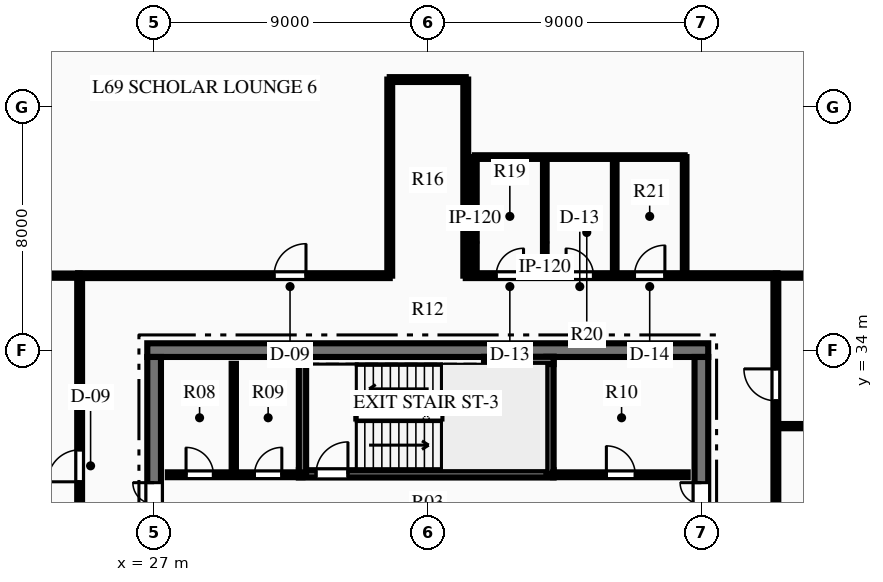
"""IFC4 building model, lengths in metres.
Left out: names, types, materials, properties, quantities, classifications, styles, units other than length and angle.
Written with IfcOpenShell. Run it as: python <this file> out.ifc"""

import sys

from ifc_helpers import new_model, si_unit, direction, frame, frame_2d, origin, place, context, subcontext, project, spatial, rectangle, extrude, element, fill, save


model = new_model("IFC4")
c1 = context("Model", 3, precision=1e-05, world=origin(), true_north=direction((0.0, 1.0)))
c2 = subcontext(c1, "Body", "Model", "MODEL_VIEW")
j1 = project(units=[si_unit("LENGTHUNIT", "METRE"), si_unit("PLANEANGLEUNIT", "RADIAN")], contexts=[c1])
p1 = place(None, origin())
s1 = spatial("IfcSite", under=j1, at=p1, CompositionType="ELEMENT")
p2 = place(p1, origin())
s2 = spatial("IfcBuilding", under=s1, at=p2, CompositionType="ELEMENT")
p3 = place(p2, frame((0.0, 0.0, 274.95)))
s3 = spatial("IfcBuildingStorey", under=s2, at=p3, CompositionType="ELEMENT", Elevation=274.95)
p4 = place(p3, frame((26.775, 34.0, 0.0), z_axis=(0.0, 0.0, 1.0), x_axis=(1.0, 0.0, 0.0)))
e1 = element("IfcWall", 1, at=p4, inside=s3, PredefinedType="SHEAR", context=c2, shape_type="SweptSolid", body=[
    extrude(rectangle(XDim=18.45, YDim=0.45, at=frame_2d((9.225, 0.0))), origin(), (0.0, 0.0, 1.0), 3.75),
])
p5 = place(p3, frame((27.0, 18.225, 0.0), z_axis=(0.0, 0.0, 1.0), x_axis=(0.0, 1.0, 0.0)))
e2 = element("IfcWall", 2, at=p5, inside=s3, PredefinedType="SHEAR", context=c2, shape_type="SweptSolid", body=[
    extrude(rectangle(XDim=15.55, YDim=0.45, at=frame_2d((7.775, 0.0))), origin(), (0.0, 0.0, 1.0), 3.75),
])
p6 = place(p5, frame((10.015, 0.0, 0.0)))
e3 = element("IfcOpeningElement", 3, at=p6, cuts=e2, PredefinedType="OPENING", context=c2, shape_type="SweptSolid", body=[
    extrude(rectangle(XDim=1.4, YDim=2.2, at=frame_2d((0.7, 1.1))), frame((0.0, 0.235, 0.0), z_axis=(0.0, -1.0, 0.0), x_axis=(1.0, 0.0, 0.0)), (0.0, 0.0, 1.0), 0.47),
])
p7 = place(p3, frame((45.0, 18.225, 0.0), z_axis=(0.0, 0.0, 1.0), x_axis=(0.0, 1.0, 0.0)))
e4 = element("IfcWall", 4, at=p7, inside=s3, PredefinedType="SHEAR", context=c2, shape_type="SweptSolid", body=[
    extrude(rectangle(XDim=15.55, YDim=0.45, at=frame_2d((7.775, 0.0))), origin(), (0.0, 0.0, 1.0), 3.75),
])
p8 = place(p7, frame((10.015, 0.0, 0.0)))
e5 = element("IfcOpeningElement", 5, at=p8, cuts=e4, PredefinedType="OPENING", context=c2, shape_type="SweptSolid", body=[
    extrude(rectangle(XDim=1.4, YDim=2.2, at=frame_2d((0.7, 1.1))), frame((0.0, 0.235, 0.0), z_axis=(0.0, -1.0, 0.0), x_axis=(1.0, 0.0, 0.0)), (0.0, 0.0, 1.0), 0.47),
])
p9 = place(p3, frame((31.76, 29.93, 0.0), z_axis=(0.0, 0.0, 1.0), x_axis=(1.0, 0.0, 0.0)))
e6 = element("IfcWall", 6, at=p9, inside=s3, PredefinedType="SHEAR", context=c2, shape_type="SweptSolid", body=[
    extrude(rectangle(XDim=8.38, YDim=0.24, at=frame_2d((4.19, 0.0))), origin(), (0.0, 0.0, 1.0), 3.75),
])
p10 = place(p9, frame((0.565, 0.0, 0.0)))
e7 = element("IfcOpeningElement", 7, at=p10, cuts=e6, PredefinedType="OPENING", context=c2, shape_type="SweptSolid", body=[
    extrude(rectangle(XDim=1.05, YDim=2.15, at=frame_2d((0.525, 1.075))), frame((0.0, 0.13, 0.0), z_axis=(0.0, -1.0, 0.0), x_axis=(1.0, 0.0, 0.0)), (0.0, 0.0, 1.0), 0.26),
])
p11 = place(p3, frame((31.88, 29.93, 0.0), z_axis=(0.0, 0.0, 1.0), x_axis=(0.0, 1.0, 0.0)))
e8 = element("IfcWall", 8, at=p11, inside=s3, PredefinedType="SHEAR", context=c2, shape_type="SweptSolid", body=[
    extrude(rectangle(XDim=3.79, YDim=0.24, at=frame_2d((1.895, 0.0))), origin(), (0.0, 0.0, 1.0), 3.75),
])
p12 = place(p3, frame((40.02, 29.93, 0.0), z_axis=(0.0, 0.0, 1.0), x_axis=(0.0, 1.0, 0.0)))
e9 = element("IfcWall", 9, at=p12, inside=s3, PredefinedType="SHEAR", context=c2, shape_type="SweptSolid", body=[
    extrude(rectangle(XDim=3.85, YDim=0.24, at=frame_2d((1.925, 0.0))), origin(), (0.0, 0.0, 1.0), 3.75),
])
p13 = place(p3, frame((37.85, 33.66, 0.0), z_axis=(0.0, 0.0, 1.0), x_axis=(1.0, 0.0, 0.0)))
e10 = element("IfcWall", 10, at=p13, inside=s3, PredefinedType="SHEAR", context=c2, shape_type="SweptSolid", body=[
    extrude(rectangle(XDim=2.29, YDim=0.24, at=frame_2d((1.145, 0.0))), origin(), (0.0, 0.0, 1.0), 3.75),
])
p14 = place(p3, frame((27.45, 29.9, 0.0), z_axis=(0.0, 0.0, 1.0), x_axis=(1.0, 0.0, 0.0)))
e11 = element("IfcWall", 11, at=p14, inside=s3, PredefinedType="PARTITIONING", context=c2, shape_type="SweptSolid", body=[
    extrude(rectangle(XDim=4.43, YDim=0.16, at=frame_2d((2.215, 0.0))), origin(), (0.0, 0.0, 1.0), 3.48),
])
p15 = place(p14, frame((0.6, 0.0, 0.0)))
e12 = element("IfcOpeningElement", 12, at=p15, cuts=e11, PredefinedType="OPENING", context=c2, shape_type="SweptSolid", body=[
    extrude(rectangle(XDim=0.9, YDim=2.15, at=frame_2d((0.45, 1.075))), frame((0.0, 0.09, 0.0), z_axis=(0.0, -1.0, 0.0), x_axis=(1.0, 0.0, 0.0)), (0.0, 0.0, 1.0), 0.18),
])
p16 = place(p14, frame((2.85, 0.0, 0.0)))
e13 = element("IfcOpeningElement", 13, at=p16, cuts=e11, PredefinedType="OPENING", context=c2, shape_type="SweptSolid", body=[
    extrude(rectangle(XDim=0.9, YDim=2.15, at=frame_2d((0.45, 1.075))), frame((0.0, 0.09, 0.0), z_axis=(0.0, -1.0, 0.0), x_axis=(1.0, 0.0, 0.0)), (0.0, 0.0, 1.0), 0.18),
])
p17 = place(p3, frame((29.62, 29.95, 0.0), z_axis=(0.0, 0.0, 1.0), x_axis=(0.0, 1.0, 0.0)))
e14 = element("IfcWall", 14, at=p17, inside=s3, PredefinedType="PARTITIONING", context=c2, shape_type="SweptSolid", body=[
    extrude(rectangle(XDim=3.6, YDim=0.14, at=frame_2d((1.8, 0.0))), origin(), (0.0, 0.0, 1.0), 3.48),
])
p18 = place(p3, frame((40.12, 29.9, 0.0), z_axis=(0.0, 0.0, 1.0), x_axis=(1.0, 0.0, 0.0)))
e15 = element("IfcWall", 15, at=p18, inside=s3, PredefinedType="PARTITIONING", context=c2, shape_type="SweptSolid", body=[
    extrude(rectangle(XDim=4.43, YDim=0.16, at=frame_2d((2.215, 0.0))), origin(), (0.0, 0.0, 1.0), 3.48),
])
p19 = place(p18, frame((1.755, 0.0, 0.0)))
e16 = element("IfcOpeningElement", 16, at=p19, cuts=e15, PredefinedType="OPENING", context=c2, shape_type="SweptSolid", body=[
    extrude(rectangle(XDim=0.95, YDim=2.15, at=frame_2d((0.475, 1.075))), frame((0.0, 0.09, 0.0), z_axis=(0.0, -1.0, 0.0), x_axis=(1.0, 0.0, 0.0)), (0.0, 0.0, 1.0), 0.18),
])
p20 = place(p3, frame((24.5, 36.45, 0.0), z_axis=(0.0, 0.0, 1.0), x_axis=(1.0, 0.0, 0.0)))
e17 = element("IfcWall", 17, at=p20, inside=s3, PredefinedType="PARTITIONING", context=c2, shape_type="SweptSolid", body=[
    extrude(rectangle(XDim=10.25, YDim=0.16, at=frame_2d((5.125, 0.0))), origin(), (0.0, 0.0, 1.0), 3.48),
])
p21 = place(p20, frame((6.445, 0.0, 0.0)))
e18 = element("IfcOpeningElement", 18, at=p21, cuts=e17, PredefinedType="OPENING", context=c2, shape_type="SweptSolid", body=[
    extrude(rectangle(XDim=1.05, YDim=2.15, at=frame_2d((0.525, 1.075))), frame((0.0, 0.09, 0.0), z_axis=(0.0, -1.0, 0.0), x_axis=(1.0, 0.0, 0.0)), (0.0, 0.0, 1.0), 0.18),
])
p22 = place(p3, frame((37.25, 36.45, 0.0), z_axis=(0.0, 0.0, 1.0), x_axis=(1.0, 0.0, 0.0)))
e19 = element("IfcWall", 19, at=p22, inside=s3, PredefinedType="PARTITIONING", context=c2, shape_type="SweptSolid", body=[
    extrude(rectangle(XDim=10.25, YDim=0.16, at=frame_2d((5.125, 0.0))), origin(), (0.0, 0.0, 1.0), 3.48),
])
p23 = place(p22, frame((1.0, 0.0, 0.0)))
e20 = element("IfcOpeningElement", 20, at=p23, cuts=e19, PredefinedType="OPENING", context=c2, shape_type="SweptSolid", body=[
    extrude(rectangle(XDim=0.9, YDim=2.15, at=frame_2d((0.45, 1.075))), frame((0.0, 0.09, 0.0), z_axis=(0.0, -1.0, 0.0), x_axis=(1.0, 0.0, 0.0)), (0.0, 0.0, 1.0), 0.18),
])
p24 = place(p22, frame((3.3, 0.0, 0.0)))
e21 = element("IfcOpeningElement", 21, at=p24, cuts=e19, PredefinedType="OPENING", context=c2, shape_type="SweptSolid", body=[
    extrude(rectangle(XDim=0.9, YDim=2.15, at=frame_2d((0.45, 1.075))), frame((0.0, 0.09, 0.0), z_axis=(0.0, -1.0, 0.0), x_axis=(1.0, 0.0, 0.0)), (0.0, 0.0, 1.0), 0.18),
])
p25 = place(p22, frame((5.55, 0.0, 0.0)))
e22 = element("IfcOpeningElement", 22, at=p25, cuts=e19, PredefinedType="OPENING", context=c2, shape_type="SweptSolid", body=[
    extrude(rectangle(XDim=1.0, YDim=2.15, at=frame_2d((0.5, 1.075))), frame((0.0, 0.09, 0.0), z_axis=(0.0, -1.0, 0.0), x_axis=(1.0, 0.0, 0.0)), (0.0, 0.0, 1.0), 0.18),
])
p26 = place(p3, frame((24.55, 27.25, 0.0), z_axis=(0.0, 0.0, 1.0), x_axis=(0.0, 1.0, 0.0)))
e23 = element("IfcWall", 23, at=p26, inside=s3, PredefinedType="PARTITIONING", context=c2, shape_type="SweptSolid", body=[
    extrude(rectangle(XDim=9.2, YDim=0.16, at=frame_2d((4.6, 0.0))), origin(), (0.0, 0.0, 1.0), 3.48),
])
p27 = place(p26, frame((2.419, 0.0, 0.0)))
e24 = element("IfcOpeningElement", 24, at=p27, cuts=e23, PredefinedType="OPENING", context=c2, shape_type="SweptSolid", body=[
    extrude(rectangle(XDim=1.05, YDim=2.15, at=frame_2d((0.525, 1.075))), frame((0.0, 0.09, 0.0), z_axis=(0.0, -1.0, 0.0), x_axis=(1.0, 0.0, 0.0)), (0.0, 0.0, 1.0), 0.18),
])
p28 = place(p3, frame((47.45, 27.25, 0.0), z_axis=(0.0, 0.0, 1.0), x_axis=(0.0, 1.0, 0.0)))
e25 = element("IfcWall", 25, at=p28, inside=s3, PredefinedType="PARTITIONING", context=c2, shape_type="SweptSolid", body=[
    extrude(rectangle(XDim=9.2, YDim=0.16, at=frame_2d((4.6, 0.0))), origin(), (0.0, 0.0, 1.0), 3.48),
])
p29 = place(p28, frame((5.083, 0.0, 0.0)))
e26 = element("IfcOpeningElement", 26, at=p29, cuts=e25, PredefinedType="OPENING", context=c2, shape_type="SweptSolid", body=[
    extrude(rectangle(XDim=1.05, YDim=2.15, at=frame_2d((0.525, 1.075))), frame((0.0, 0.09, 0.0), z_axis=(0.0, -1.0, 0.0), x_axis=(1.0, 0.0, 0.0)), (0.0, 0.0, 1.0), 0.18),
])
for number, where, z_axis, x_axis in (
    (27, (34.75, 36.45, 0.0), (0.0, 0.0, 1.0), (0.0, 1.0, 0.0)),
    (28, (37.25, 36.45, 0.0), (0.0, 0.0, 1.0), (0.0, 1.0, 0.0)),
):
    element("IfcWall", number, at=place(p3, frame(where, z_axis=z_axis, x_axis=x_axis)), inside=s3, PredefinedType="PARTITIONING", context=c2, shape_type="SweptSolid", body=[
        extrude(rectangle(XDim=6.45, YDim=0.16, at=frame_2d((3.225, 0.0))), origin(), (0.0, 0.0, 1.0), 3.48),
    ])
p30 = place(p3, frame((34.75, 42.9, 0.0), z_axis=(0.0, 0.0, 1.0), x_axis=(1.0, 0.0, 0.0)))
e29 = element("IfcWall", 29, at=p30, inside=s3, PredefinedType="PARTITIONING", context=c2, shape_type="SweptSolid", body=[
    extrude(rectangle(XDim=2.5, YDim=0.16, at=frame_2d((1.25, 0.0))), origin(), (0.0, 0.0, 1.0), 3.48),
])
for number, where, z_axis, x_axis in (
    (30, (37.55, 36.45, 0.0), (0.0, 0.0, 1.0), (0.0, 1.0, 0.0)),
    (31, (39.85, 36.45, 0.0), (0.0, 0.0, 1.0), (0.0, 1.0, 0.0)),
    (32, (42.15, 36.45, 0.0), (0.0, 0.0, 1.0), (0.0, 1.0, 0.0)),
    (33, (44.45, 36.45, 0.0), (0.0, 0.0, 1.0), (0.0, 1.0, 0.0)),
):
    element("IfcWall", number, at=place(p3, frame(where, z_axis=z_axis, x_axis=x_axis)), inside=s3, PredefinedType="PARTITIONING", context=c2, shape_type="SweptSolid", body=[
        extrude(rectangle(XDim=3.9, YDim=0.12, at=frame_2d((1.95, 0.0))), origin(), (0.0, 0.0, 1.0), 3.48),
    ])
p31 = place(p3, frame((37.55, 40.35, 0.0), z_axis=(0.0, 0.0, 1.0), x_axis=(1.0, 0.0, 0.0)))
e34 = element("IfcWall", 34, at=p31, inside=s3, PredefinedType="PARTITIONING", context=c2, shape_type="SweptSolid", body=[
    extrude(rectangle(XDim=6.9, YDim=0.12, at=frame_2d((3.45, 0.0))), origin(), (0.0, 0.0, 1.0), 3.48),
])
p32 = place(p3, frame((16.966, 36.45, 0.0), z_axis=(0.0, 0.0, 1.0), x_axis=(1.0, 0.0, 0.0)))
e35 = element("IfcWall", 35, at=p32, inside=s3, PredefinedType="PARTITIONING", context=c2, shape_type="SweptSolid", body=[
    extrude(rectangle(XDim=7.584, YDim=0.14, at=frame_2d((3.792, 0.0))), origin(), (0.0, 0.0, 1.0), 3.48),
])
p33 = place(p3, frame((47.45, 36.45, 0.0), z_axis=(0.0, 0.0, 1.0), x_axis=(1.0, 0.0, 0.0)))
e36 = element("IfcWall", 36, at=p33, inside=s3, PredefinedType="PARTITIONING", context=c2, shape_type="SweptSolid", body=[
    extrude(rectangle(XDim=15.377, YDim=0.14, at=frame_2d((7.688, 0.0))), origin(), (0.0, 0.0, 1.0), 2.858),
])
p34 = place(p3, frame((47.45, 31.5, 0.0), z_axis=(0.0, 0.0, 1.0), x_axis=(1.0, 0.0, 0.0)))
e37 = element("IfcWall", 37, at=p34, inside=s3, PredefinedType="PARTITIONING", context=c2, shape_type="SweptSolid", body=[
    extrude(rectangle(XDim=13.92, YDim=0.14, at=frame_2d((6.96, 0.0))), origin(), (0.0, 0.0, 1.0), 2.858),
])
p35 = place(p15, origin())
e38 = element("IfcDoor", 38, at=p35, inside=s3, OperationType="SINGLE_SWING_LEFT", PredefinedType="DOOR", context=c2, shape_type="SweptSolid", body=[
    extrude(rectangle(XDim=0.9, YDim=2.15, at=frame_2d((0.45, 1.075))), frame((0.0, 0.025, 0.0), z_axis=(0.0, -1.0, 0.0), x_axis=(1.0, 0.0, 0.0)), (0.0, 0.0, 1.0), 0.05),
])
fill(e12, e38)
p36 = place(p16, origin())
e39 = element("IfcDoor", 39, at=p36, inside=s3, OperationType="SINGLE_SWING_RIGHT", PredefinedType="DOOR", context=c2, shape_type="SweptSolid", body=[
    extrude(rectangle(XDim=0.9, YDim=2.15, at=frame_2d((0.45, 1.075))), frame((0.0, 0.025, 0.0), z_axis=(0.0, -1.0, 0.0), x_axis=(1.0, 0.0, 0.0)), (0.0, 0.0, 1.0), 0.05),
])
fill(e13, e39)
p37 = place(p19, origin())
e40 = element("IfcDoor", 40, at=p37, inside=s3, OperationType="SINGLE_SWING_LEFT", PredefinedType="DOOR", context=c2, shape_type="SweptSolid", body=[
    extrude(rectangle(XDim=0.95, YDim=2.15, at=frame_2d((0.475, 1.075))), frame((0.0, 0.025, 0.0), z_axis=(0.0, -1.0, 0.0), x_axis=(1.0, 0.0, 0.0)), (0.0, 0.0, 1.0), 0.05),
])
fill(e16, e40)
p38 = place(p10, origin())
e41 = element("IfcDoor", 41, at=p38, inside=s3, OperationType="SINGLE_SWING_RIGHT", PredefinedType="DOOR", context=c2, shape_type="SweptSolid", body=[
    extrude(rectangle(XDim=1.05, YDim=2.15, at=frame_2d((0.525, 1.075))), frame((0.0, 0.025, 0.0), z_axis=(0.0, -1.0, 0.0), x_axis=(1.0, 0.0, 0.0)), (0.0, 0.0, 1.0), 0.05),
])
fill(e7, e41)
p39 = place(p6, origin())
e42 = element("IfcDoor", 42, at=p39, inside=s3, OperationType="DOUBLE_DOOR_SINGLE_SWING", PredefinedType="DOOR", context=c2, shape_type="SweptSolid", body=[
    extrude(rectangle(XDim=1.4, YDim=2.2, at=frame_2d((0.7, 1.1))), frame((0.0, 0.025, 0.0), z_axis=(0.0, -1.0, 0.0), x_axis=(1.0, 0.0, 0.0)), (0.0, 0.0, 1.0), 0.05),
])
fill(e3, e42)
p40 = place(p8, origin())
e43 = element("IfcDoor", 43, at=p40, inside=s3, OperationType="DOUBLE_DOOR_SINGLE_SWING", PredefinedType="DOOR", context=c2, shape_type="SweptSolid", body=[
    extrude(rectangle(XDim=1.4, YDim=2.2, at=frame_2d((0.7, 1.1))), frame((0.0, 0.025, 0.0), z_axis=(0.0, -1.0, 0.0), x_axis=(1.0, 0.0, 0.0)), (0.0, 0.0, 1.0), 0.05),
])
fill(e5, e43)
p41 = place(p23, origin())
e44 = element("IfcDoor", 44, at=p41, inside=s3, OperationType="SINGLE_SWING_RIGHT", PredefinedType="DOOR", context=c2, shape_type="SweptSolid", body=[
    extrude(rectangle(XDim=0.9, YDim=2.15, at=frame_2d((0.45, 1.075))), frame((0.0, 0.025, 0.0), z_axis=(0.0, -1.0, 0.0), x_axis=(1.0, 0.0, 0.0)), (0.0, 0.0, 1.0), 0.05),
])
fill(e20, e44)
p42 = place(p24, origin())
e45 = element("IfcDoor", 45, at=p42, inside=s3, OperationType="SINGLE_SWING_LEFT", PredefinedType="DOOR", context=c2, shape_type="SweptSolid", body=[
    extrude(rectangle(XDim=0.9, YDim=2.15, at=frame_2d((0.45, 1.075))), frame((0.0, 0.025, 0.0), z_axis=(0.0, -1.0, 0.0), x_axis=(1.0, 0.0, 0.0)), (0.0, 0.0, 1.0), 0.05),
])
fill(e21, e45)
p43 = place(p25, origin())
e46 = element("IfcDoor", 46, at=p43, inside=s3, OperationType="SINGLE_SWING_RIGHT", PredefinedType="DOOR", context=c2, shape_type="SweptSolid", body=[
    extrude(rectangle(XDim=1.0, YDim=2.15, at=frame_2d((0.5, 1.075))), frame((0.0, 0.025, 0.0), z_axis=(0.0, -1.0, 0.0), x_axis=(1.0, 0.0, 0.0)), (0.0, 0.0, 1.0), 0.05),
])
fill(e22, e46)
p44 = place(p21, origin())
e47 = element("IfcDoor", 47, at=p44, inside=s3, OperationType="SINGLE_SWING_RIGHT", PredefinedType="DOOR", context=c2, shape_type="SweptSolid", body=[
    extrude(rectangle(XDim=1.05, YDim=2.15, at=frame_2d((0.525, 1.075))), frame((0.0, 0.025, 0.0), z_axis=(0.0, -1.0, 0.0), x_axis=(1.0, 0.0, 0.0)), (0.0, 0.0, 1.0), 0.05),
])
fill(e18, e47)
p45 = place(p27, origin())
e48 = element("IfcDoor", 48, at=p45, inside=s3, OperationType="SINGLE_SWING_LEFT", PredefinedType="DOOR", context=c2, shape_type="SweptSolid", body=[
    extrude(rectangle(XDim=1.05, YDim=2.15, at=frame_2d((0.525, 1.075))), frame((0.0, 0.025, 0.0), z_axis=(0.0, -1.0, 0.0), x_axis=(1.0, 0.0, 0.0)), (0.0, 0.0, 1.0), 0.05),
])
fill(e24, e48)
p46 = place(p29, origin())
e49 = element("IfcDoor", 49, at=p46, inside=s3, OperationType="SINGLE_SWING_RIGHT", PredefinedType="DOOR", context=c2, shape_type="SweptSolid", body=[
    extrude(rectangle(XDim=1.05, YDim=2.15, at=frame_2d((0.525, 1.075))), frame((0.0, 0.025, 0.0), z_axis=(0.0, -1.0, 0.0), x_axis=(1.0, 0.0, 0.0)), (0.0, 0.0, 1.0), 0.05),
])
fill(e26, e49)
save(model, sys.argv[1])
